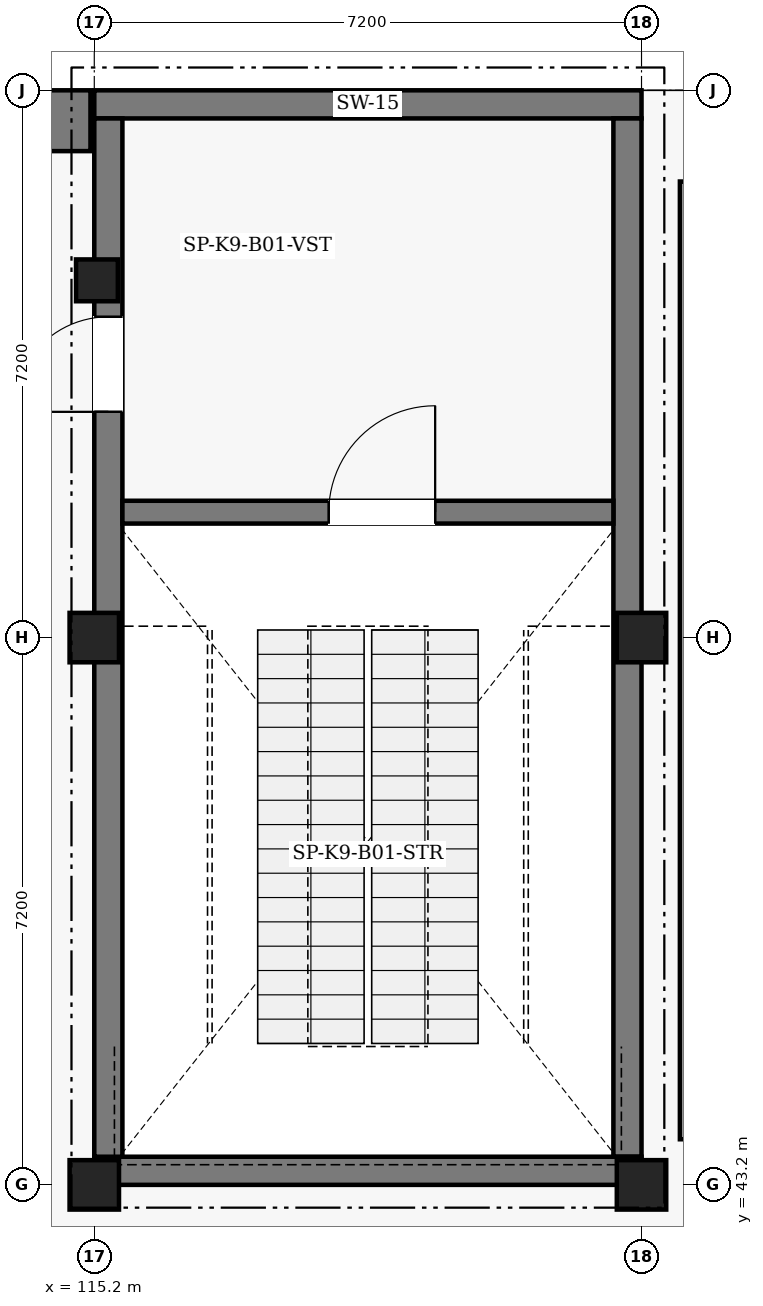
"""IFC4 building model, lengths in metres.
Left out: names, types, materials, properties, quantities, classifications, styles, units other than length and angle.
Written with IfcOpenShell. Run it as: python <this file> out.ifc"""

import sys

from ifc_helpers import new_model, si_unit, direction, frame, frame_2d, origin, origin_2d, place, context, subcontext, project, spatial, rectangle, extrude, element, fill, save


model = new_model("IFC4")
c1 = context("Model", 3, precision=1e-05, world=origin(), true_north=direction((0.0, 1.0)))
c2 = subcontext(c1, "Body", "Model", "MODEL_VIEW")
j1 = project(units=[si_unit("LENGTHUNIT", "METRE"), si_unit("PLANEANGLEUNIT", "RADIAN")], contexts=[c1])
p1 = place(None, origin())
s1 = spatial("IfcSite", under=j1, at=p1, CompositionType="ELEMENT")
p2 = place(p1, origin())
s2 = spatial("IfcBuilding", under=s1, at=p2, CompositionType="ELEMENT")
p3 = place(p2, frame((0.0, 0.0, -5.4)))
s3 = spatial("IfcBuildingStorey", under=s2, at=p3, CompositionType="ELEMENT", Elevation=-5.4)
p4 = place(p3, frame((109.8, 57.2, 0.0), z_axis=(0.0, 0.0, 1.0), x_axis=(1.0, 0.0, 0.0)))
e1 = element("IfcWall", 1, at=p4, inside=s3, PredefinedType="USERDEFINED", context=c2, shape_type="SweptSolid", body=[
    extrude(rectangle(XDim=5.35, YDim=0.8, at=frame_2d((2.675, 0.0))), origin(), (0.0, 0.0, 1.0), 4.95),
])
p5 = place(p3, frame((115.2, 57.415, 0.0), z_axis=(0.0, 0.0, 1.0), x_axis=(1.0, 0.0, 0.0)))
e2 = element("IfcWall", 2, at=p5, inside=s3, PredefinedType="SHEAR", context=c2, shape_type="SweptSolid", body=[
    extrude(rectangle(XDim=7.2, YDim=0.37, at=frame_2d((3.6, 0.0))), origin(), (0.0, 0.0, 1.0), 5.4),
])
p6 = place(p3, frame((122.215, 57.23, 0.0), z_axis=(0.0, 0.0, 1.0), x_axis=(0.0, -1.0, 0.0)))
e3 = element("IfcWall", 3, at=p6, inside=s3, PredefinedType="SHEAR", context=c2, shape_type="SweptSolid", body=[
    extrude(rectangle(XDim=13.66, YDim=0.37, at=frame_2d((6.83, 0.0))), origin(), (0.0, 0.0, 1.0), 5.4),
])
p7 = place(p3, frame((122.4, 43.385, 0.0), z_axis=(0.0, 0.0, 1.0), x_axis=(-1.0, 0.0, 0.0)))
e4 = element("IfcWall", 4, at=p7, inside=s3, PredefinedType="SHEAR", context=c2, shape_type="SweptSolid", body=[
    extrude(rectangle(XDim=7.2, YDim=0.37, at=frame_2d((3.6, 0.0))), origin(), (0.0, 0.0, 1.0), 5.4),
])
p8 = place(p3, frame((115.385, 43.57, 0.0), z_axis=(0.0, 0.0, 1.0), x_axis=(0.0, 1.0, 0.0)))
e5 = element("IfcWall", 5, at=p8, inside=s3, PredefinedType="SHEAR", context=c2, shape_type="SweptSolid", body=[
    extrude(rectangle(XDim=13.66, YDim=0.37, at=frame_2d((6.83, 0.0))), origin(), (0.0, 0.0, 1.0), 5.4),
])
p9 = place(p8, frame((9.8, 0.0, 0.0)))
e6 = element("IfcOpeningElement", 6, at=p9, cuts=e5, PredefinedType="OPENING", context=c2, shape_type="SweptSolid", body=[
    extrude(rectangle(XDim=1.25, YDim=2.2, at=frame_2d((0.625, 1.1))), frame((0.0, 0.195, 0.0), z_axis=(0.0, -1.0, 0.0), x_axis=(1.0, 0.0, 0.0)), (0.0, 0.0, 1.0), 0.39),
])
p10 = place(p3, frame((115.57, 52.05, 0.0), z_axis=(0.0, 0.0, 1.0), x_axis=(1.0, 0.0, 0.0)))
e7 = element("IfcWall", 7, at=p10, inside=s3, PredefinedType="SHEAR", context=c2, shape_type="SweptSolid", body=[
    extrude(rectangle(XDim=6.46, YDim=0.3, at=frame_2d((3.23, 0.0))), origin(), (0.0, 0.0, 1.0), 5.4),
])
p11 = place(p10, frame((2.715, 0.0, 0.0)))
e8 = element("IfcOpeningElement", 8, at=p11, cuts=e7, PredefinedType="OPENING", context=c2, shape_type="SweptSolid", body=[
    extrude(rectangle(XDim=1.4, YDim=2.2, at=frame_2d((0.7, 1.1))), frame((0.0, 0.16, 0.0), z_axis=(0.0, -1.0, 0.0), x_axis=(1.0, 0.0, 0.0)), (0.0, 0.0, 1.0), 0.32),
])
for number, where, z_axis, x_axis in (
    (9, (115.2, 43.2, 0.0), (0.0, 0.0, 1.0), (1.0, 0.0, 0.0)),
    (10, (115.2, 50.4, 0.0), (0.0, 0.0, 1.0), (1.0, 0.0, 0.0)),
    (11, (122.4, 43.2, 0.0), (0.0, 0.0, 1.0), (1.0, 0.0, 0.0)),
    (12, (122.4, 50.4, 0.0), (0.0, 0.0, 1.0), (1.0, 0.0, 0.0)),
):
    element("IfcColumn", number, at=place(p3, frame(where, z_axis=z_axis, x_axis=x_axis)), inside=s3, PredefinedType="COLUMN", context=c2, shape_type="SweptSolid", body=[
        extrude(rectangle(XDim=0.65, YDim=0.65, at=origin_2d()), origin(), (0.0, 0.0, 1.0), 5.04),
    ])
p12 = place(p3, frame((115.235, 55.1, 0.0), z_axis=(0.0, 0.0, 1.0), x_axis=(1.0, 0.0, 0.0)))
e13 = element("IfcColumn", 13, at=p12, inside=s3, PredefinedType="COLUMN", context=c2, shape_type="SweptSolid", body=[
    extrude(rectangle(XDim=0.55, YDim=0.55, at=origin_2d()), origin(), (0.0, 0.0, 1.0), 4.95),
])
p13 = place(p3, frame((123.0, 43.8, 0.0), z_axis=(0.0, 0.0, 1.0), x_axis=(0.0, 1.0, 0.0)))
e14 = element("IfcWall", 14, at=p13, inside=s3, PredefinedType="PARTITIONING", context=c2, shape_type="SweptSolid", body=[
    extrude(rectangle(XDim=12.6, YDim=0.19, at=frame_2d((6.3, 0.0))), origin(), (0.0, 0.0, 1.0), 4.45),
])
p14 = place(p11, origin())
e15 = element("IfcDoor", 15, at=p14, inside=s3, OperationType="SINGLE_SWING_RIGHT", PredefinedType="DOOR", context=c2, shape_type="SweptSolid", body=[
    extrude(rectangle(XDim=1.4, YDim=2.2, at=frame_2d((0.7, 1.1))), frame((0.0, 0.025, 0.0), z_axis=(0.0, -1.0, 0.0), x_axis=(1.0, 0.0, 0.0)), (0.0, 0.0, 1.0), 0.05),
])
fill(e8, e15)
p15 = place(p9, origin())
e16 = element("IfcDoor", 16, at=p15, inside=s3, OperationType="SINGLE_SWING_LEFT", PredefinedType="DOOR", context=c2, shape_type="SweptSolid", body=[
    extrude(rectangle(XDim=1.25, YDim=2.2, at=frame_2d((0.625, 1.1))), frame((0.0, 0.025, 0.0), z_axis=(0.0, -1.0, 0.0), x_axis=(1.0, 0.0, 0.0)), (0.0, 0.0, 1.0), 0.05),
])
fill(e6, e16)
save(model, sys.argv[1])
